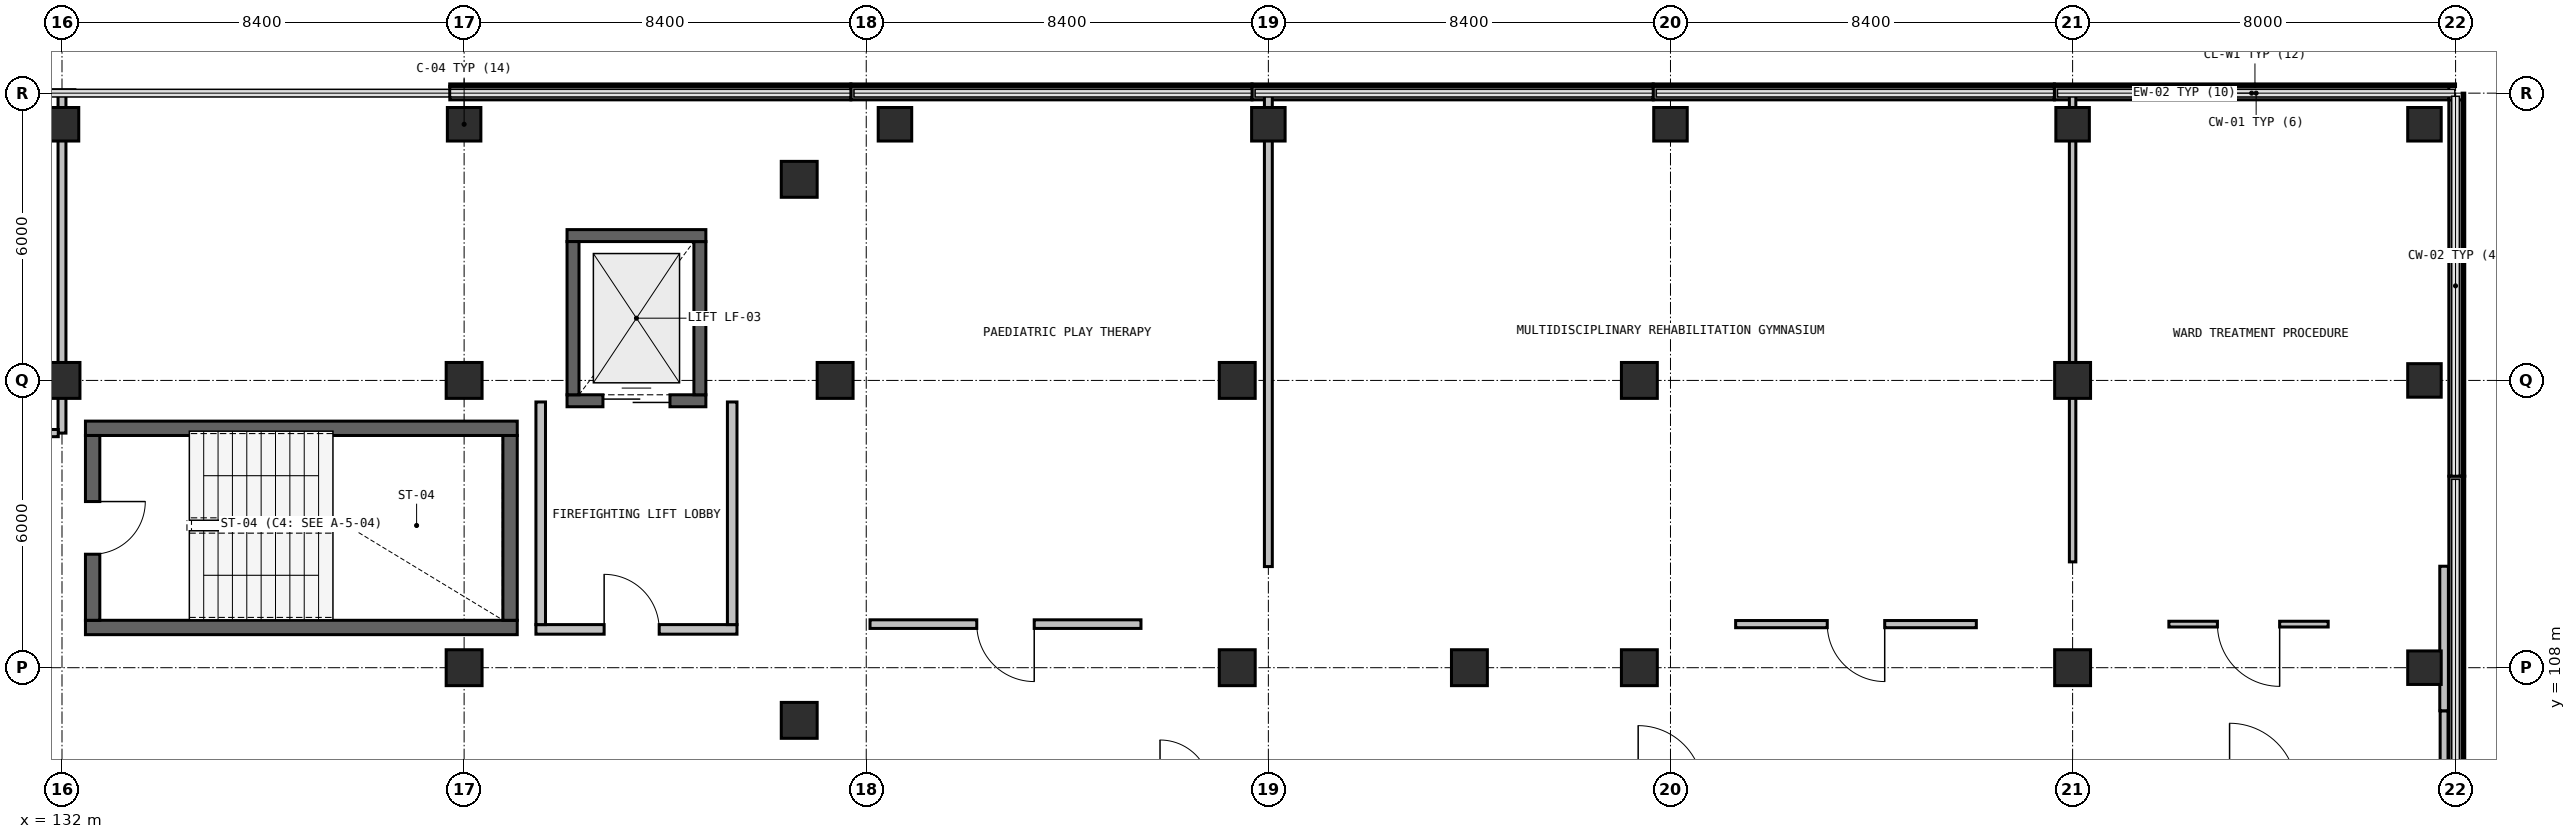
"""IFC4 building model, lengths in metres.
Left out: names, types, materials, properties, quantities, classifications, styles, units other than length and angle.
Written with IfcOpenShell. Run it as: python <this file> out.ifc"""

import sys

from ifc_helpers import new_model, si_unit, direction, frame, frame_2d, origin, origin_2d, place, context, subcontext, project, spatial, rectangle, extrude, element, fill, save


model = new_model("IFC4")
c1 = context("Model", 3, precision=1e-05, world=origin(), true_north=direction((0.0, 1.0)))
c2 = subcontext(c1, "Body", "Model", "MODEL_VIEW")
j1 = project(units=[si_unit("LENGTHUNIT", "METRE"), si_unit("PLANEANGLEUNIT", "RADIAN")], contexts=[c1])
p1 = place(None, origin())
s1 = spatial("IfcSite", under=j1, at=p1, CompositionType="ELEMENT")
p2 = place(p1, origin())
s2 = spatial("IfcBuilding", under=s1, at=p2, CompositionType="ELEMENT")
p3 = place(p2, frame((0.0, 0.0, 19.2)))
s3 = spatial("IfcBuildingStorey", under=s2, at=p3, CompositionType="ELEMENT", Elevation=19.2)
for number, where, z_axis, x_axis in (
    (1, (147.4, 106.9, 0.0), (0.0, 0.0, 1.0), (1.0, 0.0, 0.0)),
    (2, (147.4, 118.2, 0.0), (0.0, 0.0, 1.0), (1.0, 0.0, 0.0)),
    (3, (161.4, 108.0, 0.0), (0.0, 0.0, 1.0), (1.0, 0.0, 0.0)),
):
    element("IfcColumn", number, at=place(p3, frame(where, z_axis=z_axis, x_axis=x_axis)), inside=s3, PredefinedType="COLUMN", context=c2, shape_type="SweptSolid", body=[
        extrude(rectangle(XDim=0.75, YDim=0.75, at=origin_2d()), origin(), (0.0, 0.0, 1.0), 4.05),
    ])
for number, where, z_axis, x_axis in (
    (4, (149.4, 119.35, 0.0), (0.0, 0.0, 1.0), (1.0, 0.0, 0.0)),
    (5, (157.2, 119.35, 0.0), (0.0, 0.0, 1.0), (1.0, 0.0, 0.0)),
    (6, (165.6, 119.35, 0.0), (0.0, 0.0, 1.0), (1.0, 0.0, 0.0)),
    (7, (174.0, 119.35, 0.0), (0.0, 0.0, 1.0), (1.0, 0.0, 0.0)),
    (8, (181.35, 119.35, 0.0), (0.0, 0.0, 1.0), (1.0, 0.0, 0.0)),
):
    element("IfcColumn", number, at=place(p3, frame(where, z_axis=z_axis, x_axis=x_axis)), inside=s3, PredefinedType="COLUMN", context=c2, shape_type="SweptSolid", body=[
        extrude(rectangle(XDim=0.7, YDim=0.7, at=origin_2d()), origin(), (0.0, 0.0, 1.0), 4.05),
    ])
p4 = place(p3, frame((132.0, 114.0, 0.0), z_axis=(0.0, 0.0, 1.0), x_axis=(1.0, 0.0, 0.0)))
e9 = element("IfcColumn", 9, at=p4, inside=s3, PredefinedType="COLUMN", context=c2, shape_type="SweptSolid", body=[
    extrude(rectangle(XDim=0.75, YDim=0.75, at=origin_2d()), origin(), (0.0, 0.0, 1.0), 4.05),
])
p5 = place(p3, frame((132.0, 119.35, 0.0), z_axis=(0.0, 0.0, 1.0), x_axis=(1.0, 0.0, 0.0)))
e10 = element("IfcColumn", 10, at=p5, inside=s3, PredefinedType="COLUMN", context=c2, shape_type="SweptSolid", body=[
    extrude(rectangle(XDim=0.7, YDim=0.7, at=origin_2d()), origin(), (0.0, 0.0, 1.0), 4.05),
])
for number, where, z_axis, x_axis in (
    (11, (140.4, 108.0, 0.0), (0.0, 0.0, 1.0), (1.0, 0.0, 0.0)),
    (12, (140.4, 114.0, 0.0), (0.0, 0.0, 1.0), (1.0, 0.0, 0.0)),
):
    element("IfcColumn", number, at=place(p3, frame(where, z_axis=z_axis, x_axis=x_axis)), inside=s3, PredefinedType="COLUMN", context=c2, shape_type="SweptSolid", body=[
        extrude(rectangle(XDim=0.75, YDim=0.75, at=origin_2d()), origin(), (0.0, 0.0, 1.0), 4.05),
    ])
p6 = place(p3, frame((140.4, 119.35, 0.0), z_axis=(0.0, 0.0, 1.0), x_axis=(1.0, 0.0, 0.0)))
e13 = element("IfcColumn", 13, at=p6, inside=s3, PredefinedType="COLUMN", context=c2, shape_type="SweptSolid", body=[
    extrude(rectangle(XDim=0.7, YDim=0.7, at=origin_2d()), origin(), (0.0, 0.0, 1.0), 4.05),
])
for number, where, z_axis, x_axis in (
    (14, (148.15, 114.0, 0.0), (0.0, 0.0, 1.0), (1.0, 0.0, 0.0)),
    (15, (156.55, 108.0, 0.0), (0.0, 0.0, 1.0), (1.0, 0.0, 0.0)),
    (16, (156.55, 114.0, 0.0), (0.0, 0.0, 1.0), (1.0, 0.0, 0.0)),
    (17, (164.95, 108.0, 0.0), (0.0, 0.0, 1.0), (1.0, 0.0, 0.0)),
    (18, (164.95, 114.0, 0.0), (0.0, 0.0, 1.0), (1.0, 0.0, 0.0)),
    (19, (174.0, 108.0, 0.0), (0.0, 0.0, 1.0), (1.0, 0.0, 0.0)),
    (20, (174.0, 114.0, 0.0), (0.0, 0.0, 1.0), (1.0, 0.0, 0.0)),
):
    element("IfcColumn", number, at=place(p3, frame(where, z_axis=z_axis, x_axis=x_axis)), inside=s3, PredefinedType="COLUMN", context=c2, shape_type="SweptSolid", body=[
        extrude(rectangle(XDim=0.75, YDim=0.75, at=origin_2d()), origin(), (0.0, 0.0, 1.0), 4.05),
    ])
for number, where, z_axis, x_axis in (
    (21, (181.35, 108.0, 0.0), (0.0, 0.0, 1.0), (1.0, 0.0, 0.0)),
    (22, (181.35, 114.0, 0.0), (0.0, 0.0, 1.0), (1.0, 0.0, 0.0)),
):
    element("IfcColumn", number, at=place(p3, frame(where, z_axis=z_axis, x_axis=x_axis)), inside=s3, PredefinedType="COLUMN", context=c2, shape_type="SweptSolid", body=[
        extrude(rectangle(XDim=0.7, YDim=0.7, at=origin_2d()), origin(), (0.0, 0.0, 1.0), 4.05),
    ])
for number, where, z_axis, x_axis in (
    (23, (140.101, 120.0, 0.0), (0.0, 0.0, 1.0), (1.0, 0.0, 0.0)),
    (24, (148.481, 120.0, 0.0), (0.0, 0.0, 1.0), (1.0, 0.0, 0.0)),
    (25, (156.861, 120.0, 0.0), (0.0, 0.0, 1.0), (1.0, 0.0, 0.0)),
    (26, (165.241, 120.0, 0.0), (0.0, 0.0, 1.0), (1.0, 0.0, 0.0)),
):
    element("IfcWall", number, at=place(p3, frame(where, z_axis=z_axis, x_axis=x_axis)), inside=s3, PredefinedType="SOLIDWALL", context=c2, shape_type="SweptSolid", body=[
        extrude(rectangle(XDim=8.376, YDim=0.28, at=frame_2d((4.188, 0.0))), origin(), (0.0, 0.0, 1.0), 0.94),
    ])
p7 = place(p3, frame((173.621, 120.0, 0.0), z_axis=(0.0, 0.0, 1.0), x_axis=(1.0, 0.0, 0.0)))
e27 = element("IfcWall", 27, at=p7, inside=s3, PredefinedType="SOLIDWALL", context=c2, shape_type="SweptSolid", body=[
    extrude(rectangle(XDim=8.238, YDim=0.28, at=frame_2d((4.119, 0.0))), origin(), (0.0, 0.0, 1.0), 0.94),
])
p8 = place(p3, frame((181.999, 119.86, 0.0), z_axis=(0.0, 0.0, 1.0), x_axis=(0.0, -1.0, 0.0)))
e28 = element("IfcWall", 28, at=p8, inside=s3, PredefinedType="SOLIDWALL", context=c2, shape_type="SweptSolid", body=[
    extrude(rectangle(XDim=7.858, YDim=0.28, at=frame_2d((3.929, 0.0))), origin(), (0.0, 0.0, 1.0), 0.94),
])
p9 = place(p3, frame((181.999, 111.998, 0.0), z_axis=(0.0, 0.0, 1.0), x_axis=(0.000122144863, -0.99999999254, 0.0)))
e29 = element("IfcWall", 29, at=p9, inside=s3, PredefinedType="SOLIDWALL", context=c2, shape_type="SweptSolid", body=[
    extrude(rectangle(XDim=7.995, YDim=0.28, at=frame_2d((3.998, 0.0))), origin(), (0.0, 0.0, 1.0), 0.94),
])
p10 = place(p3, frame((132.49, 108.84, 0.0), z_axis=(0.0, 0.0, 1.0), x_axis=(1.0, 0.0, 0.0)))
e30 = element("IfcWall", 30, at=p10, inside=s3, PredefinedType="SHEAR", context=c2, shape_type="SweptSolid", body=[
    extrude(rectangle(XDim=9.02, YDim=0.3, at=frame_2d((4.51, 0.0))), origin(), (0.0, 0.0, 1.0), 3.77),
])
p11 = place(p3, frame((141.36, 108.99, 0.0), z_axis=(0.0, 0.0, 1.0), x_axis=(0.0, 1.0, 0.0)))
e31 = element("IfcWall", 31, at=p11, inside=s3, PredefinedType="SHEAR", context=c2, shape_type="SweptSolid", body=[
    extrude(rectangle(XDim=3.86, YDim=0.3, at=frame_2d((1.93, 0.0))), origin(), (0.0, 0.0, 1.0), 3.77),
])
p12 = place(p3, frame((141.51, 113.0, 0.0), z_axis=(0.0, 0.0, 1.0), x_axis=(-1.0, 0.0, 0.0)))
e32 = element("IfcWall", 32, at=p12, inside=s3, PredefinedType="SHEAR", context=c2, shape_type="SweptSolid", body=[
    extrude(rectangle(XDim=9.02, YDim=0.3, at=frame_2d((4.51, 0.0))), origin(), (0.0, 0.0, 1.0), 3.77),
])
p13 = place(p3, frame((132.64, 112.85, 0.0), z_axis=(0.0, 0.0, 1.0), x_axis=(0.0, -1.0, 0.0)))
e33 = element("IfcWall", 33, at=p13, inside=s3, PredefinedType="SHEAR", context=c2, shape_type="SweptSolid", body=[
    extrude(rectangle(XDim=3.86, YDim=0.3, at=frame_2d((1.93, 0.0))), origin(), (0.0, 0.0, 1.0), 3.77),
])
p14 = place(p13, frame((1.38, 0.0, 0.0)))
e34 = element("IfcOpeningElement", 34, at=p14, cuts=e33, PredefinedType="OPENING", context=c2, shape_type="SweptSolid", body=[
    extrude(rectangle(XDim=1.1, YDim=2.15, at=frame_2d((0.55, 1.075))), frame((0.0, 0.16, 0.0), z_axis=(0.0, -1.0, 0.0), x_axis=(1.0, 0.0, 0.0)), (0.0, 0.0, 1.0), 0.32),
])
p15 = place(p3, frame((141.9, 108.8, 0.0), z_axis=(0.0, 0.0, 1.0), x_axis=(1.0, 0.0, 0.0)))
e35 = element("IfcWall", 35, at=p15, inside=s3, PredefinedType="SOLIDWALL", context=c2, shape_type="SweptSolid", body=[
    extrude(rectangle(XDim=4.2, YDim=0.2, at=frame_2d((2.1, 0.0))), origin(), (0.0, 0.0, 1.0), 3.77),
])
p16 = place(p15, frame((1.425, 0.0, 0.0)))
e36 = element("IfcOpeningElement", 36, at=p16, cuts=e35, PredefinedType="OPENING", context=c2, shape_type="SweptSolid", body=[
    extrude(rectangle(XDim=1.15, YDim=2.15, at=frame_2d((0.575, 1.075))), frame((0.0, 0.11, 0.0), z_axis=(0.0, -1.0, 0.0), x_axis=(1.0, 0.0, 0.0)), (0.0, 0.0, 1.0), 0.22),
])
for number, where, z_axis, x_axis in (
    (37, (146.0, 108.9, 0.0), (0.0, 0.0, 1.0), (0.0, 1.0, 0.0)),
    (38, (142.0, 113.55, 0.0), (0.0, 0.0, 1.0), (0.0, -1.0, 0.0)),
):
    element("IfcWall", number, at=place(p3, frame(where, z_axis=z_axis, x_axis=x_axis)), inside=s3, PredefinedType="SOLIDWALL", context=c2, shape_type="SweptSolid", body=[
        extrude(rectangle(XDim=4.65, YDim=0.2, at=frame_2d((2.325, 0.0))), origin(), (0.0, 0.0, 1.0), 3.77),
    ])
p17 = place(p3, frame((142.55, 113.575, 0.0), z_axis=(0.0, 0.0, 1.0), x_axis=(1.0, 0.0, 0.0)))
e39 = element("IfcWall", 39, at=p17, inside=s3, PredefinedType="SHEAR", context=c2, shape_type="SweptSolid", body=[
    extrude(rectangle(XDim=2.9, YDim=0.25, at=frame_2d((1.45, 0.0))), origin(), (0.0, 0.0, 1.0), 3.77),
])
p18 = place(p17, frame((0.75, 0.0, 0.0)))
e40 = element("IfcOpeningElement", 40, at=p18, cuts=e39, PredefinedType="OPENING", context=c2, shape_type="SweptSolid", body=[
    extrude(rectangle(XDim=1.4, YDim=2.15, at=frame_2d((0.7, 1.075))), frame((0.0, 0.135, 0.0), z_axis=(0.0, -1.0, 0.0), x_axis=(1.0, 0.0, 0.0)), (0.0, 0.0, 1.0), 0.27),
])
p19 = place(p3, frame((145.325, 113.7, 0.0), z_axis=(0.0, 0.0, 1.0), x_axis=(0.0, 1.0, 0.0)))
e41 = element("IfcWall", 41, at=p19, inside=s3, PredefinedType="SHEAR", context=c2, shape_type="SweptSolid", body=[
    extrude(rectangle(XDim=3.2, YDim=0.25, at=frame_2d((1.6, 0.0))), origin(), (0.0, 0.0, 1.0), 3.77),
])
p20 = place(p3, frame((145.45, 117.025, 0.0), z_axis=(0.0, 0.0, 1.0), x_axis=(-1.0, 0.0, 0.0)))
e42 = element("IfcWall", 42, at=p20, inside=s3, PredefinedType="SHEAR", context=c2, shape_type="SweptSolid", body=[
    extrude(rectangle(XDim=2.9, YDim=0.25, at=frame_2d((1.45, 0.0))), origin(), (0.0, 0.0, 1.0), 3.77),
])
p21 = place(p3, frame((142.675, 116.9, 0.0), z_axis=(0.0, 0.0, 1.0), x_axis=(0.0, -1.0, 0.0)))
e43 = element("IfcWall", 43, at=p21, inside=s3, PredefinedType="SHEAR", context=c2, shape_type="SweptSolid", body=[
    extrude(rectangle(XDim=3.2, YDim=0.25, at=frame_2d((1.6, 0.0))), origin(), (0.0, 0.0, 1.0), 3.77),
])
p22 = place(p3, frame((181.76, 105.526, 0.0), z_axis=(0.0, 0.0, 1.0), x_axis=(0.0, 1.0, 0.0)))
e44 = element("IfcWall", 44, at=p22, inside=s3, PredefinedType="PARTITIONING", context=c2, shape_type="SweptSolid", body=[
    extrude(rectangle(XDim=1.574, YDim=0.165, at=frame_2d((0.787, 0.0))), origin(), (0.0, 0.0, 1.0), 3.77),
])
p23 = place(p3, frame((132.0, 119.989, 0.0), z_axis=(0.0, 0.0, 1.0), x_axis=(0.0, -1.0, 0.0)))
e45 = element("IfcWall", 45, at=p23, inside=s3, PredefinedType="PARTITIONING", context=c2, shape_type="SweptSolid", body=[
    extrude(rectangle(XDim=7.089, YDim=0.165, at=frame_2d((3.544, 0.0))), origin(), (0.0, 0.0, 1.0), 3.12),
])
p24 = place(p3, frame((131.922, 112.9, 0.0), z_axis=(0.0, 0.0, 1.0), x_axis=(-1.0, 0.0, 0.0)))
e46 = element("IfcWall", 46, at=p24, inside=s3, PredefinedType="PARTITIONING", context=c2, shape_type="SweptSolid", body=[
    extrude(rectangle(XDim=1.912, YDim=0.15, at=frame_2d((0.956, 0.0))), origin(), (0.0, 0.0, 1.0), 3.77),
])
p25 = place(p3, frame((154.539, 108.91, 0.0), z_axis=(0.0, 0.0, 1.0), x_axis=(-1.0, 0.0, 0.0)))
e47 = element("IfcWall", 47, at=p25, inside=s3, PredefinedType="PARTITIONING", context=c2, shape_type="SweptSolid", body=[
    extrude(rectangle(XDim=5.66, YDim=0.18, at=frame_2d((2.83, 0.0))), origin(), (0.0, 0.0, 1.0), 3.77),
])
p26 = place(p25, frame((2.23, 0.0, 0.0)))
e48 = element("IfcOpeningElement", 48, at=p26, cuts=e47, PredefinedType="OPENING", context=c2, shape_type="SweptSolid", body=[
    extrude(rectangle(XDim=1.2, YDim=2.15, at=frame_2d((0.6, 1.075))), frame((0.0, 0.1, 0.0), z_axis=(0.0, -1.0, 0.0), x_axis=(1.0, 0.0, 0.0)), (0.0, 0.0, 1.0), 0.2),
])
p27 = place(p3, frame((157.2, 119.958, 0.0), z_axis=(0.0, 0.0, 1.0), x_axis=(0.0, -1.0, 0.0)))
e49 = element("IfcWall", 49, at=p27, inside=s3, PredefinedType="PARTITIONING", context=c2, shape_type="SweptSolid", body=[
    extrude(rectangle(XDim=9.846, YDim=0.165, at=frame_2d((4.923, 0.0))), origin(), (0.0, 0.0, 1.0), 3.77),
])
p28 = place(p3, frame((171.989, 108.91, 0.0), z_axis=(0.0, 0.0, 1.0), x_axis=(-1.0, 0.0, 0.0)))
e50 = element("IfcWall", 50, at=p28, inside=s3, PredefinedType="PARTITIONING", context=c2, shape_type="SweptSolid", body=[
    extrude(rectangle(XDim=5.028, YDim=0.15, at=frame_2d((2.514, 0.0))), origin(), (0.0, 0.0, 1.0), 3.77),
])
p29 = place(p28, frame((1.914, 0.0, 0.0)))
e51 = element("IfcOpeningElement", 51, at=p29, cuts=e50, PredefinedType="OPENING", context=c2, shape_type="SweptSolid", body=[
    extrude(rectangle(XDim=1.2, YDim=2.15, at=frame_2d((0.6, 1.075))), frame((0.0, 0.085, 0.0), z_axis=(0.0, -1.0, 0.0), x_axis=(1.0, 0.0, 0.0)), (0.0, 0.0, 1.0), 0.17),
])
p30 = place(p3, frame((174.0, 119.958, 0.0), z_axis=(0.0, 0.0, 1.0), x_axis=(0.0, -1.0, 0.0)))
e52 = element("IfcWall", 52, at=p30, inside=s3, PredefinedType="PARTITIONING", context=c2, shape_type="SweptSolid", body=[
    extrude(rectangle(XDim=9.748, YDim=0.135, at=frame_2d((4.874, 0.0))), origin(), (0.0, 0.0, 1.0), 3.12),
])
p31 = place(p3, frame((179.339, 108.91, 0.0), z_axis=(0.0, 0.0, 1.0), x_axis=(-1.0, 0.0, 0.0)))
e53 = element("IfcWall", 53, at=p31, inside=s3, PredefinedType="PARTITIONING", context=c2, shape_type="SweptSolid", body=[
    extrude(rectangle(XDim=3.328, YDim=0.12, at=frame_2d((1.664, 0.0))), origin(), (0.0, 0.0, 1.0), 3.77),
])
p32 = place(p31, frame((1.014, 0.0, 0.0)))
e54 = element("IfcOpeningElement", 54, at=p32, cuts=e53, PredefinedType="OPENING", context=c2, shape_type="SweptSolid", body=[
    extrude(rectangle(XDim=1.3, YDim=2.15, at=frame_2d((0.65, 1.075))), frame((0.0, 0.07, 0.0), z_axis=(0.0, -1.0, 0.0), x_axis=(1.0, 0.0, 0.0)), (0.0, 0.0, 1.0), 0.14),
])
p33 = place(p3, frame((181.76, 107.1, 0.0), z_axis=(0.0, 0.0, 1.0), x_axis=(0.0, 1.0, 0.0)))
e55 = element("IfcWall", 55, at=p33, inside=s3, PredefinedType="PARTITIONING", context=c2, shape_type="SweptSolid", body=[
    extrude(rectangle(XDim=3.019, YDim=0.18, at=frame_2d((1.509, 0.0))), origin(), (0.0, 0.0, 1.0), 3.77),
])
p34 = place(p14, origin())
e56 = element("IfcDoor", 56, at=p34, inside=s3, OperationType="SINGLE_SWING_LEFT", PredefinedType="DOOR", context=c2, shape_type="SweptSolid", body=[
    extrude(rectangle(XDim=1.1, YDim=2.15, at=frame_2d((0.55, 1.075))), frame((0.0, 0.025, 0.0), z_axis=(0.0, -1.0, 0.0), x_axis=(1.0, 0.0, 0.0)), (0.0, 0.0, 1.0), 0.05),
])
fill(e34, e56)
p35 = place(p16, origin())
e57 = element("IfcDoor", 57, at=p35, inside=s3, OperationType="SINGLE_SWING_RIGHT", PredefinedType="DOOR", context=c2, shape_type="SweptSolid", body=[
    extrude(rectangle(XDim=1.15, YDim=2.15, at=frame_2d((0.575, 1.075))), frame((0.0, 0.025, 0.0), z_axis=(0.0, -1.0, 0.0), x_axis=(1.0, 0.0, 0.0)), (0.0, 0.0, 1.0), 0.05),
])
fill(e36, e57)
p36 = place(p18, origin())
e58 = element("IfcDoor", 58, at=p36, inside=s3, OperationType="DOUBLE_DOOR_SLIDING", PredefinedType="DOOR", context=c2, shape_type="SweptSolid", body=[
    extrude(rectangle(XDim=1.4, YDim=2.15, at=frame_2d((0.7, 1.075))), frame((0.0, 0.025, 0.0), z_axis=(0.0, -1.0, 0.0), x_axis=(1.0, 0.0, 0.0)), (0.0, 0.0, 1.0), 0.05),
])
fill(e40, e58)
p37 = place(p26, origin())
e59 = element("IfcDoor", 59, at=p37, inside=s3, OperationType="SINGLE_SWING_RIGHT", PredefinedType="DOOR", context=c2, shape_type="SweptSolid", body=[
    extrude(rectangle(XDim=1.2, YDim=2.15, at=frame_2d((0.6, 1.075))), frame((0.0, 0.025, 0.0), z_axis=(0.0, -1.0, 0.0), x_axis=(1.0, 0.0, 0.0)), (0.0, 0.0, 1.0), 0.05),
])
fill(e48, e59)
p38 = place(p29, origin())
e60 = element("IfcDoor", 60, at=p38, inside=s3, OperationType="SINGLE_SWING_LEFT", PredefinedType="DOOR", context=c2, shape_type="SweptSolid", body=[
    extrude(rectangle(XDim=1.2, YDim=2.15, at=frame_2d((0.6, 1.075))), frame((0.0, 0.025, 0.0), z_axis=(0.0, -1.0, 0.0), x_axis=(1.0, 0.0, 0.0)), (0.0, 0.0, 1.0), 0.05),
])
fill(e51, e60)
p39 = place(p32, origin())
e61 = element("IfcDoor", 61, at=p39, inside=s3, OperationType="SINGLE_SWING_RIGHT", PredefinedType="DOOR", context=c2, shape_type="SweptSolid", body=[
    extrude(rectangle(XDim=1.3, YDim=2.15, at=frame_2d((0.65, 1.075))), frame((0.0, 0.025, 0.0), z_axis=(0.0, -1.0, 0.0), x_axis=(1.0, 0.0, 0.0)), (0.0, 0.0, 1.0), 0.05),
])
fill(e54, e61)
save(model, sys.argv[1])
